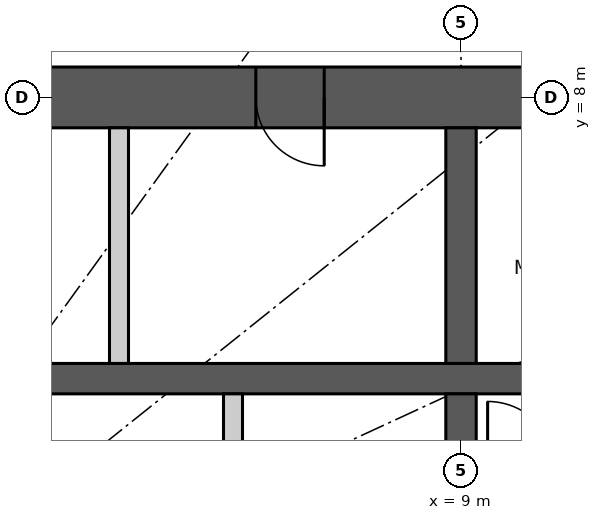
"""IFC4 building model, lengths in metres.
Left out: names, types, materials, properties, quantities, classifications, styles, units other than length and angle.
Written with IfcOpenShell. Run it as: python <this file> out.ifc"""

import sys

from ifc_helpers import new_model, si_unit, direction, frame, frame_2d, origin, place, context, subcontext, project, spatial, rectangle, extrude, element, fill, save


model = new_model("IFC4")
c1 = context("Model", 3, precision=1e-05, world=origin(), true_north=direction((0.0, 1.0)))
c2 = subcontext(c1, "Body", "Model", "MODEL_VIEW")
j1 = project(units=[si_unit("LENGTHUNIT", "METRE"), si_unit("PLANEANGLEUNIT", "RADIAN")], contexts=[c1])
p1 = place(None, origin())
s1 = spatial("IfcSite", under=j1, at=p1, CompositionType="ELEMENT")
p2 = place(p1, origin())
s2 = spatial("IfcBuilding", under=s1, at=p2, CompositionType="ELEMENT")
p3 = place(p2, frame((0.0, 0.0, 163.2)))
s3 = spatial("IfcBuildingStorey", under=s2, at=p3, CompositionType="ELEMENT", Elevation=163.2)
p4 = place(p3, frame((-12.4, 8.0, 0.0), z_axis=(0.0, 0.0, 1.0), x_axis=(1.0, 0.0, 0.0)))
e1 = element("IfcWall", 1, at=p4, inside=s3, PredefinedType="SHEAR", context=c2, shape_type="SweptSolid", body=[
    extrude(rectangle(XDim=24.8, YDim=0.8, at=frame_2d((12.4, 0.0))), origin(), (0.0, 0.0, 1.0), 3.3),
])
p5 = place(p4, frame((11.1, 0.0, 0.0)))
e2 = element("IfcOpeningElement", 2, at=p5, cuts=e1, PredefinedType="OPENING", context=c2, shape_type="SweptSolid", body=[
    extrude(rectangle(XDim=1.2, YDim=2.2, at=frame_2d((0.6, 1.1))), frame((0.0, 0.41, 0.0), z_axis=(0.0, -1.0, 0.0), x_axis=(1.0, 0.0, 0.0)), (0.0, 0.0, 1.0), 0.82),
])
p6 = place(p4, frame((18.7, 0.0, 0.0)))
e3 = element("IfcOpeningElement", 3, at=p6, cuts=e1, PredefinedType="OPENING", context=c2, shape_type="SweptSolid", body=[
    extrude(rectangle(XDim=0.9, YDim=2.2, at=frame_2d((0.45, 1.1))), frame((0.0, 0.41, 0.0), z_axis=(0.0, -1.0, 0.0), x_axis=(1.0, 0.0, 0.0)), (0.0, 0.0, 1.0), 0.82),
])
p7 = place(p3, frame((-11.6, 4.3, 0.0), z_axis=(0.0, 0.0, 1.0), x_axis=(1.0, 0.0, 0.0)))
e4 = element("IfcWall", 4, at=p7, inside=s3, PredefinedType="SHEAR", context=c2, shape_type="SweptSolid", body=[
    extrude(rectangle(XDim=23.2, YDim=0.4, at=frame_2d((11.6, 0.0))), origin(), (0.0, 0.0, 1.0), 3.3),
])
p8 = place(p3, frame((9.0, 4.5, 0.0), z_axis=(0.0, 0.0, 1.0), x_axis=(0.0, 1.0, 0.0)))
e5 = element("IfcWall", 5, at=p8, inside=s3, PredefinedType="SHEAR", context=c2, shape_type="SweptSolid", body=[
    extrude(rectangle(XDim=3.1, YDim=0.4, at=frame_2d((1.55, 0.0))), origin(), (0.0, 0.0, 1.0), 3.3),
])
p9 = place(p3, frame((9.0, 1.75, 0.0), z_axis=(0.0, 0.0, 1.0), x_axis=(0.0, 1.0, 0.0)))
e6 = element("IfcWall", 6, at=p9, inside=s3, PredefinedType="SHEAR", context=c2, shape_type="SweptSolid", body=[
    extrude(rectangle(XDim=2.35, YDim=0.4, at=frame_2d((1.175, 0.0))), origin(), (0.0, 0.0, 1.0), 3.3),
])
p10 = place(p3, frame((4.5, 4.5, 0.0), z_axis=(0.0, 0.0, 1.0), x_axis=(0.0, 1.0, 0.0)))
e7 = element("IfcWall", 7, at=p10, inside=s3, PredefinedType="PARTITIONING", context=c2, shape_type="SweptSolid", body=[
    extrude(rectangle(XDim=3.1, YDim=0.25, at=frame_2d((1.55, 0.0))), origin(), (0.0, 0.0, 1.0), 3.3),
])
p11 = place(p3, frame((6.0, 1.75, 0.0), z_axis=(0.0, 0.0, 1.0), x_axis=(0.0, 1.0, 0.0)))
e8 = element("IfcWall", 8, at=p11, inside=s3, PredefinedType="PARTITIONING", context=c2, shape_type="SweptSolid", body=[
    extrude(rectangle(XDim=2.35, YDim=0.25, at=frame_2d((1.175, 0.0))), origin(), (0.0, 0.0, 1.0), 3.3),
])
p12 = place(p6, origin())
e9 = element("IfcDoor", 9, at=p12, inside=s3, OperationType="SINGLE_SWING_RIGHT", PredefinedType="DOOR", context=c2, shape_type="SweptSolid", body=[
    extrude(rectangle(XDim=0.9, YDim=2.2, at=frame_2d((0.45, 1.1))), frame((0.0, 0.025, 0.0), z_axis=(0.0, -1.0, 0.0), x_axis=(1.0, 0.0, 0.0)), (0.0, 0.0, 1.0), 0.05),
])
fill(e3, e9)
save(model, sys.argv[1])
